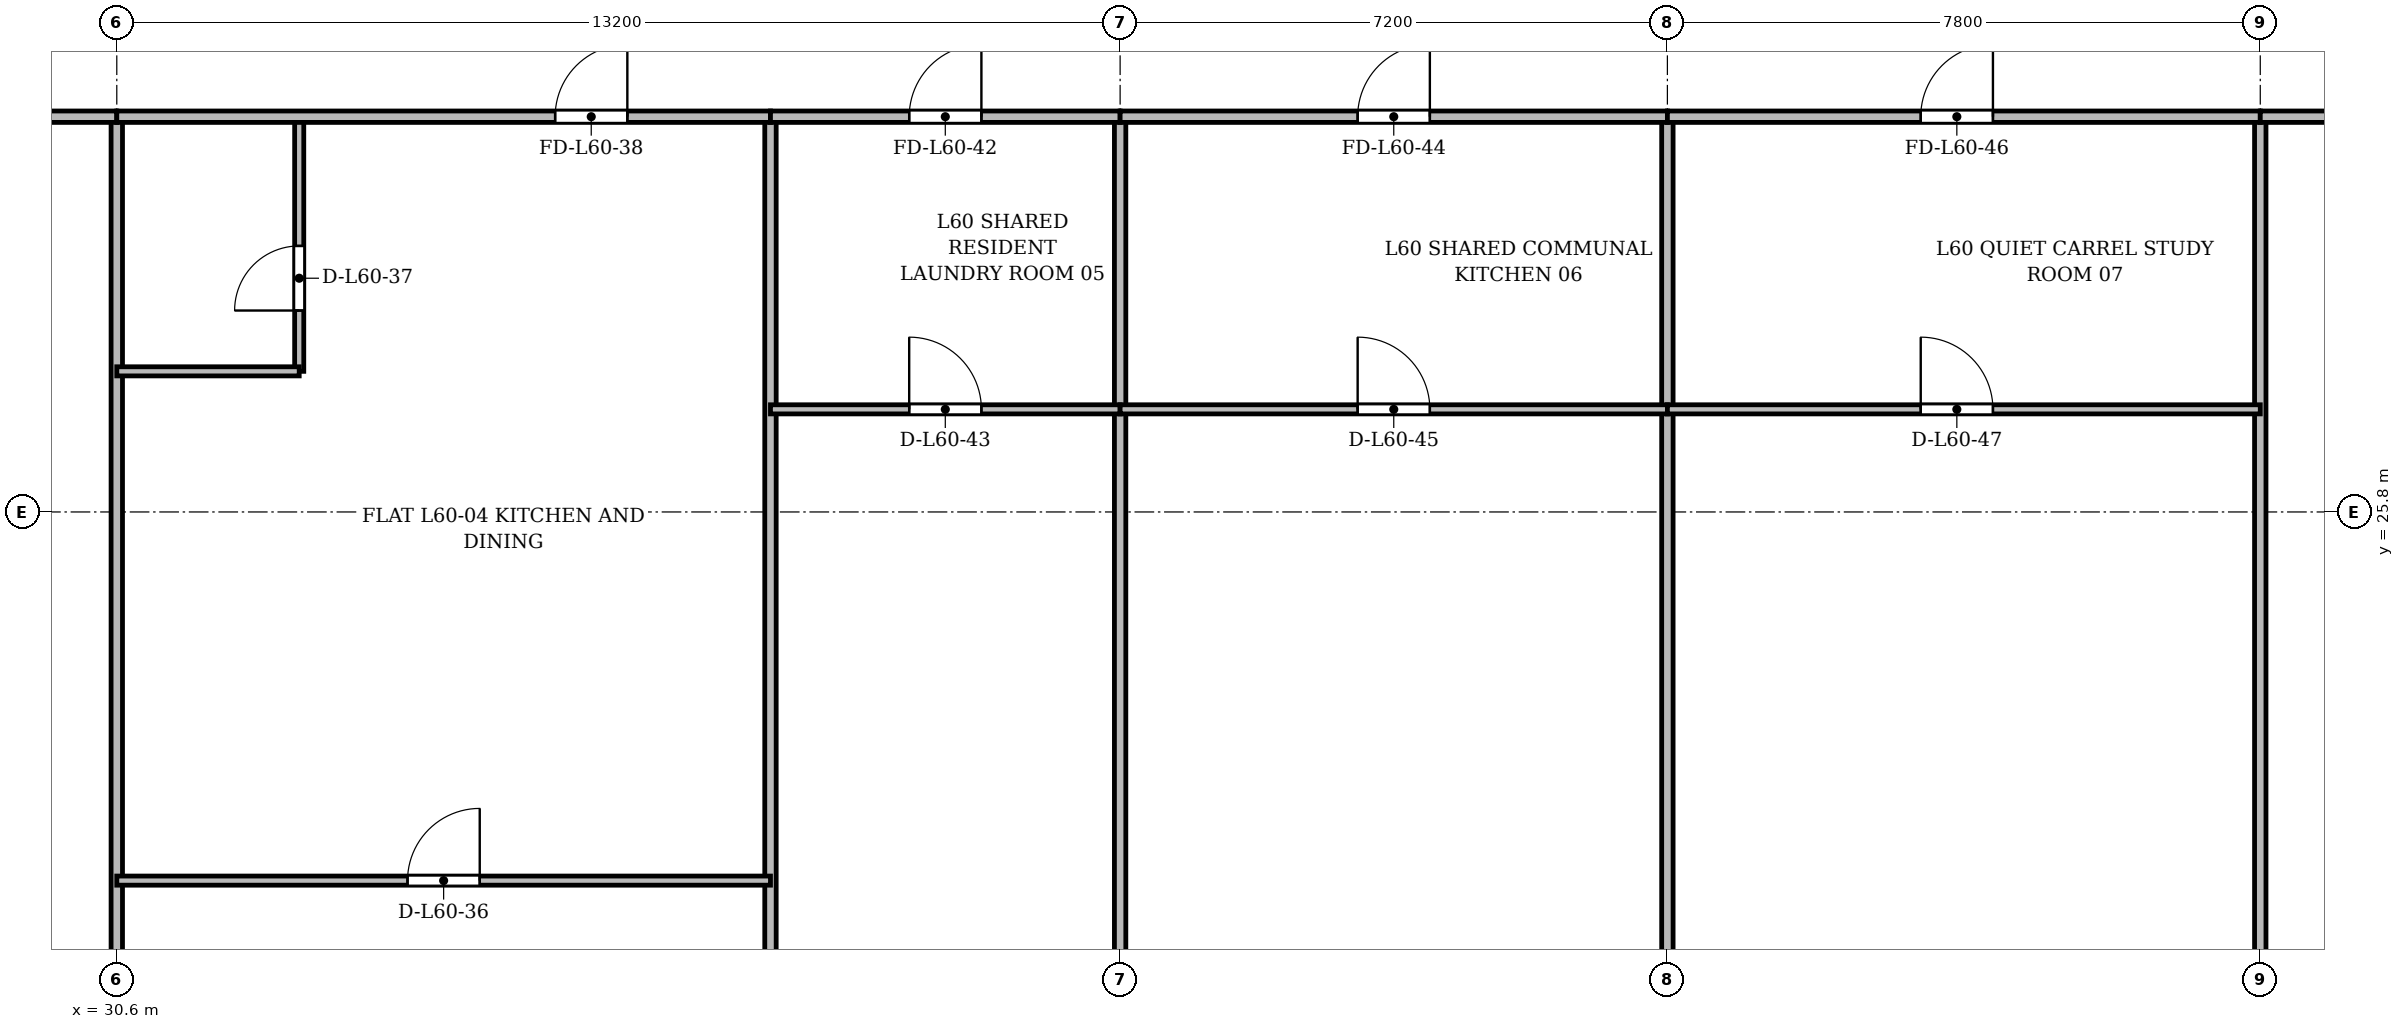
"""IFC4 building model, lengths in metres.
Left out: names, types, materials, properties, quantities, classifications, styles, units other than length and angle.
Written with IfcOpenShell. Run it as: python <this file> out.ifc"""

import sys

from ifc_helpers import new_model, si_unit, direction, frame, frame_2d, origin, place, context, subcontext, project, spatial, rectangle, extrude, source, transform, mapped, element, fill, save


model = new_model("IFC4")
c1 = context("Model", 3, precision=1e-05, world=origin(), true_north=direction((0.0, 1.0)))
c2 = subcontext(c1, "Body", "Model", "MODEL_VIEW")
j1 = project(units=[si_unit("LENGTHUNIT", "METRE"), si_unit("PLANEANGLEUNIT", "RADIAN")], contexts=[c1])
p1 = place(None, origin())
s1 = spatial("IfcSite", under=j1, at=p1, CompositionType="ELEMENT")
p2 = place(p1, origin())
s2 = spatial("IfcBuilding", under=s1, at=p2, CompositionType="ELEMENT")
p3 = place(p2, frame((0.0, 0.0, 230.1)))
s3 = spatial("IfcBuildingStorey", under=s2, at=p3, CompositionType="ELEMENT", Elevation=230.1)
p4 = place(p3, frame((30.6, 3.625, 0.0), z_axis=(0.0, 0.0, 1.0), x_axis=(0.0, 1.0, 0.0)))
e1 = element("IfcWall", 1, at=p4, inside=s3, PredefinedType="PARTITIONING", context=c2, shape_type="SweptSolid", body=[
    extrude(rectangle(XDim=27.375, YDim=0.15, at=frame_2d((13.688, 0.0))), origin(), (0.0, 0.0, 1.0), 2.86),
])
p5 = place(p3, frame((39.2, 3.625, 0.0), z_axis=(0.0, 0.0, 1.0), x_axis=(0.0, 1.0, 0.0)))
e2 = element("IfcWall", 2, at=p5, inside=s3, PredefinedType="PARTITIONING", context=c2, shape_type="SweptSolid", body=[
    extrude(rectangle(XDim=27.375, YDim=0.15, at=frame_2d((13.688, 0.0))), origin(), (0.0, 0.0, 1.0), 2.91),
])
p6 = place(p3, frame((43.8, 3.625, 0.0), z_axis=(0.0, 0.0, 1.0), x_axis=(0.0, 1.0, 0.0)))
e3 = element("IfcWall", 3, at=p6, inside=s3, PredefinedType="PARTITIONING", context=c2, shape_type="SweptSolid", body=[
    extrude(rectangle(XDim=27.375, YDim=0.15, at=frame_2d((13.688, 0.0))), origin(), (0.0, 0.0, 1.0), 2.86),
])
p7 = place(p3, frame((51.0, 7.125, 0.0), z_axis=(0.0, 0.0, 1.0), x_axis=(0.0, 1.0, 0.0)))
e4 = element("IfcWall", 4, at=p7, inside=s3, PredefinedType="PARTITIONING", context=c2, shape_type="SweptSolid", body=[
    extrude(rectangle(XDim=23.875, YDim=0.15, at=frame_2d((11.938, 0.0))), origin(), (0.0, 0.0, 1.0), 2.86),
])
p8 = place(p3, frame((58.8, 3.625, 0.0), z_axis=(0.0, 0.0, 1.0), x_axis=(0.0, 1.0, 0.0)))
e5 = element("IfcWall", 5, at=p8, inside=s3, PredefinedType="PARTITIONING", context=c2, shape_type="SweptSolid", body=[
    extrude(rectangle(XDim=27.375, YDim=0.15, at=frame_2d((13.688, 0.0))), origin(), (0.0, 0.0, 1.0), 2.86),
])
p9 = place(p3, frame((23.4, 31.0, 0.0), z_axis=(0.0, 0.0, 1.0), x_axis=(1.0, 0.0, 0.0)))
e6 = element("IfcWall", 6, at=p9, inside=s3, PredefinedType="PARTITIONING", context=c2, shape_type="SweptSolid", body=[
    extrude(rectangle(XDim=7.2, YDim=0.15, at=frame_2d((3.6, 0.0))), origin(), (0.0, 0.0, 1.0), 2.86),
])
p10 = place(p9, frame((3.125, 0.0, 0.0)))
e7 = element("IfcOpeningElement", 7, at=p10, cuts=e6, PredefinedType="OPENING", context=c2, shape_type="SweptSolid", body=[
    extrude(rectangle(XDim=0.95, YDim=2.15, at=frame_2d((0.475, 1.075))), frame((0.0, 0.085, 0.0), z_axis=(0.0, -1.0, 0.0), x_axis=(1.0, 0.0, 0.0)), (0.0, 0.0, 1.0), 0.17),
])
p11 = place(p3, frame((30.6, 20.95, 0.0), z_axis=(0.0, 0.0, 1.0), x_axis=(1.0, 0.0, 0.0)))
e8 = element("IfcWall", 8, at=p11, inside=s3, PredefinedType="PARTITIONING", context=c2, shape_type="SweptSolid", body=[
    extrude(rectangle(XDim=8.6, YDim=0.12, at=frame_2d((4.3, 0.0))), origin(), (0.0, 0.0, 1.0), 2.86),
])
p12 = place(p11, frame((3.825, 0.0, 0.0)))
e9 = element("IfcOpeningElement", 9, at=p12, cuts=e8, PredefinedType="OPENING", context=c2, shape_type="SweptSolid", body=[
    extrude(rectangle(XDim=0.95, YDim=2.15, at=frame_2d((0.475, 1.075))), frame((0.0, 0.07, 0.0), z_axis=(0.0, -1.0, 0.0), x_axis=(1.0, 0.0, 0.0)), (0.0, 0.0, 1.0), 0.14),
])
p13 = place(p3, frame((33.0, 27.65, 0.0), z_axis=(0.0, 0.0, 1.0), x_axis=(0.0, 1.0, 0.0)))
e10 = element("IfcWall", 10, at=p13, inside=s3, PredefinedType="PARTITIONING", context=c2, shape_type="SweptSolid", body=[
    extrude(rectangle(XDim=3.35, YDim=0.12, at=frame_2d((1.675, 0.0))), origin(), (0.0, 0.0, 1.0), 3.36),
])
p14 = place(p13, frame((0.8, 0.0, 0.0)))
e11 = element("IfcOpeningElement", 11, at=p14, cuts=e10, PredefinedType="OPENING", context=c2, shape_type="SweptSolid", body=[
    extrude(rectangle(XDim=0.85, YDim=2.1, at=frame_2d((0.425, 1.05))), frame((0.0, 0.07, 0.0), z_axis=(0.0, -1.0, 0.0), x_axis=(1.0, 0.0, 0.0)), (0.0, 0.0, 1.0), 0.14),
])
p15 = place(p3, frame((30.6, 27.65, 0.0), z_axis=(0.0, 0.0, 1.0), x_axis=(1.0, 0.0, 0.0)))
e12 = element("IfcWall", 12, at=p15, inside=s3, PredefinedType="PARTITIONING", context=c2, shape_type="SweptSolid", body=[
    extrude(rectangle(XDim=2.4, YDim=0.12, at=frame_2d((1.2, 0.0))), origin(), (0.0, 0.0, 1.0), 2.86),
])
p16 = place(p3, frame((30.6, 31.0, 0.0), z_axis=(0.0, 0.0, 1.0), x_axis=(1.0, 0.0, 0.0)))
e13 = element("IfcWall", 13, at=p16, inside=s3, PredefinedType="PARTITIONING", context=c2, shape_type="SweptSolid", body=[
    extrude(rectangle(XDim=8.6, YDim=0.15, at=frame_2d((4.3, 0.0))), origin(), (0.0, 0.0, 1.0), 2.86),
])
p17 = place(p16, frame((5.767, 0.0, 0.0)))
e14 = element("IfcOpeningElement", 14, at=p17, cuts=e13, PredefinedType="OPENING", context=c2, shape_type="SweptSolid", body=[
    extrude(rectangle(XDim=0.95, YDim=2.15, at=frame_2d((0.475, 1.075))), frame((0.0, 0.085, 0.0), z_axis=(0.0, -1.0, 0.0), x_axis=(1.0, 0.0, 0.0)), (0.0, 0.0, 1.0), 0.17),
])
p18 = place(p3, frame((39.2, 31.0, 0.0), z_axis=(0.0, 0.0, 1.0), x_axis=(1.0, 0.0, 0.0)))
e15 = element("IfcWall", 15, at=p18, inside=s3, PredefinedType="PARTITIONING", context=c2, shape_type="SweptSolid", body=[
    extrude(rectangle(XDim=4.6, YDim=0.15, at=frame_2d((2.3, 0.0))), origin(), (0.0, 0.0, 1.0), 2.86),
])
p19 = place(p18, frame((1.825, 0.0, 0.0)))
e16 = element("IfcOpeningElement", 16, at=p19, cuts=e15, PredefinedType="OPENING", context=c2, shape_type="SweptSolid", body=[
    extrude(rectangle(XDim=0.95, YDim=2.15, at=frame_2d((0.475, 1.075))), frame((0.0, 0.085, 0.0), z_axis=(0.0, -1.0, 0.0), x_axis=(1.0, 0.0, 0.0)), (0.0, 0.0, 1.0), 0.17),
])
p20 = place(p3, frame((39.2, 27.15, 0.0), z_axis=(0.0, 0.0, 1.0), x_axis=(1.0, 0.0, 0.0)))
e17 = element("IfcWall", 17, at=p20, inside=s3, PredefinedType="PARTITIONING", context=c2, shape_type="SweptSolid", body=[
    extrude(rectangle(XDim=4.6, YDim=0.12, at=frame_2d((2.3, 0.0))), origin(), (0.0, 0.0, 1.0), 2.86),
])
p21 = place(p20, frame((1.825, 0.0, 0.0)))
e18 = element("IfcOpeningElement", 18, at=p21, cuts=e17, PredefinedType="OPENING", context=c2, shape_type="SweptSolid", body=[
    extrude(rectangle(XDim=0.95, YDim=2.15, at=frame_2d((0.475, 1.075))), frame((0.0, 0.07, 0.0), z_axis=(0.0, -1.0, 0.0), x_axis=(1.0, 0.0, 0.0)), (0.0, 0.0, 1.0), 0.14),
])
p22 = place(p3, frame((43.8, 31.0, 0.0), z_axis=(0.0, 0.0, 1.0), x_axis=(1.0, 0.0, 0.0)))
e19 = element("IfcWall", 19, at=p22, inside=s3, PredefinedType="PARTITIONING", context=c2, shape_type="SweptSolid", body=[
    extrude(rectangle(XDim=7.2, YDim=0.15, at=frame_2d((3.6, 0.0))), origin(), (0.0, 0.0, 1.0), 2.86),
])
p23 = place(p22, frame((3.125, 0.0, 0.0)))
e20 = element("IfcOpeningElement", 20, at=p23, cuts=e19, PredefinedType="OPENING", context=c2, shape_type="SweptSolid", body=[
    extrude(rectangle(XDim=0.95, YDim=2.15, at=frame_2d((0.475, 1.075))), frame((0.0, 0.085, 0.0), z_axis=(0.0, -1.0, 0.0), x_axis=(1.0, 0.0, 0.0)), (0.0, 0.0, 1.0), 0.17),
])
p24 = place(p3, frame((43.8, 27.15, 0.0), z_axis=(0.0, 0.0, 1.0), x_axis=(1.0, 0.0, 0.0)))
e21 = element("IfcWall", 21, at=p24, inside=s3, PredefinedType="PARTITIONING", context=c2, shape_type="SweptSolid", body=[
    extrude(rectangle(XDim=7.2, YDim=0.12, at=frame_2d((3.6, 0.0))), origin(), (0.0, 0.0, 1.0), 2.86),
])
p25 = place(p24, frame((3.125, 0.0, 0.0)))
e22 = element("IfcOpeningElement", 22, at=p25, cuts=e21, PredefinedType="OPENING", context=c2, shape_type="SweptSolid", body=[
    extrude(rectangle(XDim=0.95, YDim=2.15, at=frame_2d((0.475, 1.075))), frame((0.0, 0.07, 0.0), z_axis=(0.0, -1.0, 0.0), x_axis=(1.0, 0.0, 0.0)), (0.0, 0.0, 1.0), 0.14),
])
p26 = place(p3, frame((51.0, 31.0, 0.0), z_axis=(0.0, 0.0, 1.0), x_axis=(1.0, 0.0, 0.0)))
e23 = element("IfcWall", 23, at=p26, inside=s3, PredefinedType="PARTITIONING", context=c2, shape_type="SweptSolid", body=[
    extrude(rectangle(XDim=7.8, YDim=0.15, at=frame_2d((3.9, 0.0))), origin(), (0.0, 0.0, 1.0), 2.86),
])
p27 = place(p26, frame((3.333, 0.0, 0.0)))
e24 = element("IfcOpeningElement", 24, at=p27, cuts=e23, PredefinedType="OPENING", context=c2, shape_type="SweptSolid", body=[
    extrude(rectangle(XDim=0.95, YDim=2.15, at=frame_2d((0.475, 1.075))), frame((0.0, 0.085, 0.0), z_axis=(0.0, -1.0, 0.0), x_axis=(1.0, 0.0, 0.0)), (0.0, 0.0, 1.0), 0.17),
])
p28 = place(p3, frame((51.0, 27.15, 0.0), z_axis=(0.0, 0.0, 1.0), x_axis=(1.0, 0.0, 0.0)))
e25 = element("IfcWall", 25, at=p28, inside=s3, PredefinedType="PARTITIONING", context=c2, shape_type="SweptSolid", body=[
    extrude(rectangle(XDim=7.8, YDim=0.12, at=frame_2d((3.9, 0.0))), origin(), (0.0, 0.0, 1.0), 2.86),
])
p29 = place(p28, frame((3.333, 0.0, 0.0)))
e26 = element("IfcOpeningElement", 26, at=p29, cuts=e25, PredefinedType="OPENING", context=c2, shape_type="SweptSolid", body=[
    extrude(rectangle(XDim=0.95, YDim=2.15, at=frame_2d((0.475, 1.075))), frame((0.0, 0.07, 0.0), z_axis=(0.0, -1.0, 0.0), x_axis=(1.0, 0.0, 0.0)), (0.0, 0.0, 1.0), 0.14),
])
p30 = place(p3, frame((58.8, 31.0, 0.0), z_axis=(0.0, 0.0, 1.0), x_axis=(1.0, 0.0, 0.0)))
e27 = element("IfcWall", 27, at=p30, inside=s3, PredefinedType="PARTITIONING", context=c2, shape_type="SweptSolid", body=[
    extrude(rectangle(XDim=7.375, YDim=0.15, at=frame_2d((3.688, 0.0))), origin(), (0.0, 0.0, 1.0), 2.86),
])
p31 = place(p30, frame((3.304, 0.0, 0.0)))
e28 = element("IfcOpeningElement", 28, at=p31, cuts=e27, PredefinedType="OPENING", context=c2, shape_type="SweptSolid", body=[
    extrude(rectangle(XDim=0.95, YDim=2.15, at=frame_2d((0.475, 1.075))), frame((0.0, 0.085, 0.0), z_axis=(0.0, -1.0, 0.0), x_axis=(1.0, 0.0, 0.0)), (0.0, 0.0, 1.0), 0.17),
])
m1 = source(origin(), c2, "Body", "SweptSolid", [
    extrude(rectangle(XDim=0.95, YDim=2.15, at=frame_2d((0.475, 1.075))), frame((0.0, 0.025, 0.0), z_axis=(0.0, -1.0, 0.0), x_axis=(1.0, 0.0, 0.0)), (0.0, 0.0, 1.0), 0.05),
])
p32 = place(p12, origin())
e29 = element("IfcDoor", 29, at=p32, inside=s3, OperationType="SINGLE_SWING_RIGHT", PredefinedType="DOOR", context=c2, shape_type="MappedRepresentation", body=[
    mapped(m1, transform((0.0, 0.0, 0.0), x_axis=(1.0, 0.0, 0.0), y_axis=(0.0, 1.0, 0.0), z_axis=(0.0, 0.0, 1.0), scale=1.0)),
])
fill(e9, e29)
m2 = source(origin(), c2, "Body", "SweptSolid", [
    extrude(rectangle(XDim=0.85, YDim=2.1, at=frame_2d((0.425, 1.05))), frame((0.0, 0.025, 0.0), z_axis=(0.0, -1.0, 0.0), x_axis=(1.0, 0.0, 0.0)), (0.0, 0.0, 1.0), 0.05),
])
p33 = place(p14, origin())
e30 = element("IfcDoor", 30, at=p33, inside=s3, OperationType="SINGLE_SWING_LEFT", PredefinedType="DOOR", context=c2, shape_type="MappedRepresentation", body=[
    mapped(m2, transform((0.0, 0.0, 0.0), x_axis=(1.0, 0.0, 0.0), y_axis=(0.0, 1.0, 0.0), z_axis=(0.0, 0.0, 1.0), scale=1.0)),
])
fill(e11, e30)
p34 = place(p17, origin())
e31 = element("IfcDoor", 31, at=p34, inside=s3, OperationType="SINGLE_SWING_RIGHT", PredefinedType="DOOR", context=c2, shape_type="MappedRepresentation", body=[
    mapped(m1, transform((0.0, 0.0, 0.0), x_axis=(1.0, 0.0, 0.0), y_axis=(0.0, 1.0, 0.0), z_axis=(0.0, 0.0, 1.0), scale=1.0)),
])
fill(e14, e31)
p35 = place(p19, origin())
e32 = element("IfcDoor", 32, at=p35, inside=s3, OperationType="SINGLE_SWING_RIGHT", PredefinedType="DOOR", context=c2, shape_type="MappedRepresentation", body=[
    mapped(m1, transform((0.0, 0.0, 0.0), x_axis=(1.0, 0.0, 0.0), y_axis=(0.0, 1.0, 0.0), z_axis=(0.0, 0.0, 1.0), scale=1.0)),
])
fill(e16, e32)
p36 = place(p21, origin())
e33 = element("IfcDoor", 33, at=p36, inside=s3, OperationType="SINGLE_SWING_LEFT", PredefinedType="DOOR", context=c2, shape_type="MappedRepresentation", body=[
    mapped(m1, transform((0.0, 0.0, 0.0), x_axis=(1.0, 0.0, 0.0), y_axis=(0.0, 1.0, 0.0), z_axis=(0.0, 0.0, 1.0), scale=1.0)),
])
fill(e18, e33)
p37 = place(p23, origin())
e34 = element("IfcDoor", 34, at=p37, inside=s3, OperationType="SINGLE_SWING_RIGHT", PredefinedType="DOOR", context=c2, shape_type="MappedRepresentation", body=[
    mapped(m1, transform((0.0, 0.0, 0.0), x_axis=(1.0, 0.0, 0.0), y_axis=(0.0, 1.0, 0.0), z_axis=(0.0, 0.0, 1.0), scale=1.0)),
])
fill(e20, e34)
p38 = place(p25, origin())
e35 = element("IfcDoor", 35, at=p38, inside=s3, OperationType="SINGLE_SWING_LEFT", PredefinedType="DOOR", context=c2, shape_type="MappedRepresentation", body=[
    mapped(m1, transform((0.0, 0.0, 0.0), x_axis=(1.0, 0.0, 0.0), y_axis=(0.0, 1.0, 0.0), z_axis=(0.0, 0.0, 1.0), scale=1.0)),
])
fill(e22, e35)
p39 = place(p27, origin())
e36 = element("IfcDoor", 36, at=p39, inside=s3, OperationType="SINGLE_SWING_RIGHT", PredefinedType="DOOR", context=c2, shape_type="MappedRepresentation", body=[
    mapped(m1, transform((0.0, 0.0, 0.0), x_axis=(1.0, 0.0, 0.0), y_axis=(0.0, 1.0, 0.0), z_axis=(0.0, 0.0, 1.0), scale=1.0)),
])
fill(e24, e36)
p40 = place(p29, origin())
e37 = element("IfcDoor", 37, at=p40, inside=s3, OperationType="SINGLE_SWING_LEFT", PredefinedType="DOOR", context=c2, shape_type="MappedRepresentation", body=[
    mapped(m1, transform((0.0, 0.0, 0.0), x_axis=(1.0, 0.0, 0.0), y_axis=(0.0, 1.0, 0.0), z_axis=(0.0, 0.0, 1.0), scale=1.0)),
])
fill(e26, e37)
save(model, sys.argv[1])
